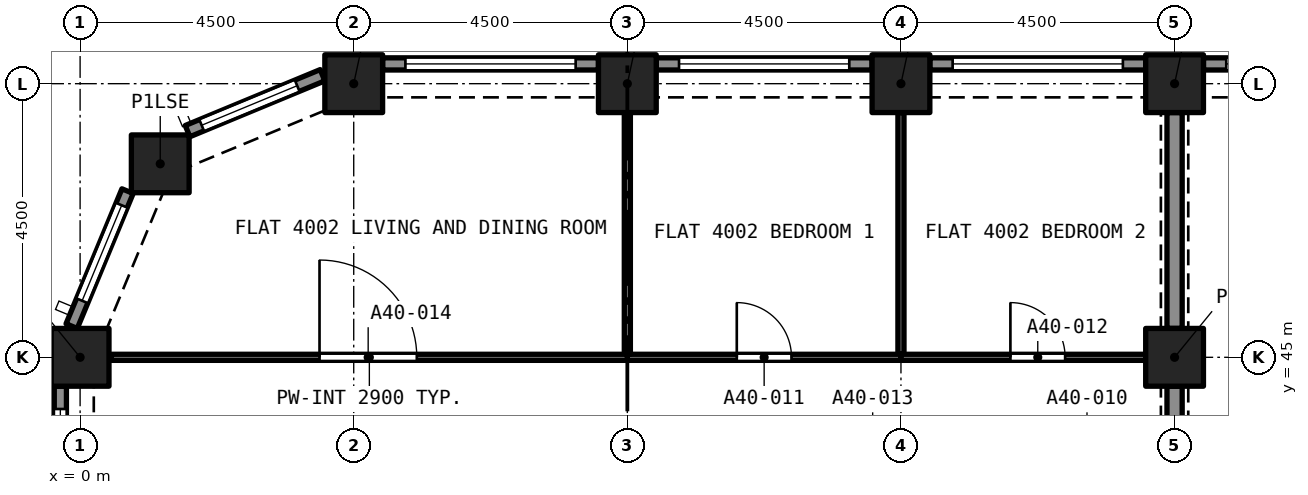
"""IFC4 building model, lengths in metres.
Left out: names, types, materials, properties, quantities, classifications, styles, units other than length and angle.
Written with IfcOpenShell. Run it as: python <this file> out.ifc"""

import sys

from ifc_helpers import new_model, si_unit, direction, frame, frame_2d, origin, origin_2d, place, context, subcontext, project, spatial, rectangle, extrude, element, fill, save


model = new_model("IFC4")
c1 = context("Model", 3, precision=1e-05, world=origin(), true_north=direction((0.0, 1.0)))
c2 = subcontext(c1, "Body", "Model", "MODEL_VIEW")
j1 = project(units=[si_unit("LENGTHUNIT", "METRE"), si_unit("PLANEANGLEUNIT", "RADIAN")], contexts=[c1])
p1 = place(None, origin())
s1 = spatial("IfcSite", under=j1, at=p1, CompositionType="ELEMENT")
p2 = place(p1, origin())
s2 = spatial("IfcBuilding", under=s1, at=p2, CompositionType="ELEMENT")
p3 = place(p2, frame((0.0, 0.0, 143.0)))
s3 = spatial("IfcBuildingStorey", under=s2, at=p3, CompositionType="ELEMENT", Elevation=143.0)
for number, where, z_axis, x_axis in (
    (1, (0.0, 45.0, 0.0), (0.0, 0.0, 1.0), (1.0, 0.0, 0.0)),
    (2, (18.0, 45.0, 0.0), (0.0, 0.0, 1.0), (1.0, 0.0, 0.0)),
    (3, (1.318, 48.182, 0.0), (0.0, 0.0, 1.0), (1.0, 0.0, 0.0)),
    (4, (4.5, 49.5, 0.0), (0.0, 0.0, 1.0), (1.0, 0.0, 0.0)),
    (5, (9.0, 49.5, 0.0), (0.0, 0.0, 1.0), (1.0, 0.0, 0.0)),
    (6, (13.5, 49.5, 0.0), (0.0, 0.0, 1.0), (1.0, 0.0, 0.0)),
    (7, (18.0, 49.5, 0.0), (0.0, 0.0, 1.0), (1.0, 0.0, 0.0)),
):
    element("IfcColumn", number, at=place(p3, frame(where, z_axis=z_axis, x_axis=x_axis)), inside=s3, PredefinedType="COLUMN", context=c2, shape_type="SweptSolid", body=[
        extrude(rectangle(XDim=0.95, YDim=0.95, at=origin_2d()), origin(), (0.0, 0.0, 1.0), 3.2),
    ])
p4 = place(p3, frame((18.475, 49.825, 0.0), z_axis=(0.0, 0.0, 1.0), x_axis=(1.0, 0.0, 0.0)))
e8 = element("IfcWall", 8, at=p4, inside=s3, PredefinedType="SOLIDWALL", context=c2, shape_type="SweptSolid", body=[
    extrude(rectangle(XDim=3.55, YDim=0.2, at=frame_2d((1.775, 0.0))), origin(), (0.0, 0.0, 1.0), 3.2),
])
p5 = place(p4, frame((0.375, 0.0, 0.45)))
e9 = element("IfcOpeningElement", 9, at=p5, cuts=e8, PredefinedType="OPENING", context=c2, shape_type="SweptSolid", body=[
    extrude(rectangle(XDim=2.8, YDim=1.95, at=frame_2d((1.4, 0.975))), frame((0.0, 0.11, 0.0), z_axis=(0.0, -1.0, 0.0), x_axis=(1.0, 0.0, 0.0)), (0.0, 0.0, 1.0), 0.22),
])
p6 = place(p3, frame((13.975, 49.825, 0.0), z_axis=(0.0, 0.0, 1.0), x_axis=(1.0, 0.0, 0.0)))
e10 = element("IfcWall", 10, at=p6, inside=s3, PredefinedType="SOLIDWALL", context=c2, shape_type="SweptSolid", body=[
    extrude(rectangle(XDim=3.55, YDim=0.2, at=frame_2d((1.775, 0.0))), origin(), (0.0, 0.0, 1.0), 3.2),
])
p7 = place(p6, frame((0.375, 0.0, 0.45)))
e11 = element("IfcOpeningElement", 11, at=p7, cuts=e10, PredefinedType="OPENING", context=c2, shape_type="SweptSolid", body=[
    extrude(rectangle(XDim=2.8, YDim=1.95, at=frame_2d((1.4, 0.975))), frame((0.0, 0.11, 0.0), z_axis=(0.0, -1.0, 0.0), x_axis=(1.0, 0.0, 0.0)), (0.0, 0.0, 1.0), 0.22),
])
p8 = place(p3, frame((9.475, 49.825, 0.0), z_axis=(0.0, 0.0, 1.0), x_axis=(1.0, 0.0, 0.0)))
e12 = element("IfcWall", 12, at=p8, inside=s3, PredefinedType="SOLIDWALL", context=c2, shape_type="SweptSolid", body=[
    extrude(rectangle(XDim=3.55, YDim=0.2, at=frame_2d((1.775, 0.0))), origin(), (0.0, 0.0, 1.0), 3.2),
])
p9 = place(p8, frame((0.375, 0.0, 0.45)))
e13 = element("IfcOpeningElement", 13, at=p9, cuts=e12, PredefinedType="OPENING", context=c2, shape_type="SweptSolid", body=[
    extrude(rectangle(XDim=2.8, YDim=1.95, at=frame_2d((1.4, 0.975))), frame((0.0, 0.11, 0.0), z_axis=(0.0, -1.0, 0.0), x_axis=(1.0, 0.0, 0.0)), (0.0, 0.0, 1.0), 0.22),
])
p10 = place(p3, frame((4.975, 49.825, 0.0), z_axis=(0.0, 0.0, 1.0), x_axis=(1.0, 0.0, 0.0)))
e14 = element("IfcWall", 14, at=p10, inside=s3, PredefinedType="SOLIDWALL", context=c2, shape_type="SweptSolid", body=[
    extrude(rectangle(XDim=3.55, YDim=0.2, at=frame_2d((1.775, 0.0))), origin(), (0.0, 0.0, 1.0), 3.2),
])
p11 = place(p10, frame((0.375, 0.0, 0.45)))
e15 = element("IfcOpeningElement", 15, at=p11, cuts=e14, PredefinedType="OPENING", context=c2, shape_type="SweptSolid", body=[
    extrude(rectangle(XDim=2.8, YDim=1.95, at=frame_2d((1.4, 0.975))), frame((0.0, 0.11, 0.0), z_axis=(0.0, -1.0, 0.0), x_axis=(1.0, 0.0, 0.0)), (0.0, 0.0, 1.0), 0.22),
])
p12 = place(p3, frame((1.767, 48.72, 0.0), z_axis=(0.0, 0.0, 1.0), x_axis=(0.923880599843, 0.382680855588, 0.0)))
e16 = element("IfcWall", 16, at=p12, inside=s3, PredefinedType="SOLIDWALL", context=c2, shape_type="SweptSolid", body=[
    extrude(rectangle(XDim=2.403, YDim=0.2, at=frame_2d((1.201, 0.0))), origin(), (0.0, 0.0, 1.0), 3.2),
])
p13 = place(p12, frame((0.251, 0.0, 0.45)))
e17 = element("IfcOpeningElement", 17, at=p13, cuts=e16, PredefinedType="OPENING", context=c2, shape_type="SweptSolid", body=[
    extrude(rectangle(XDim=1.7, YDim=1.95, at=frame_2d((0.85, 0.975))), frame((0.0, 0.11, 0.0), z_axis=(0.0, -1.0, 0.0), x_axis=(1.0, 0.0, 0.0)), (0.0, 0.0, 1.0), 0.22),
])
p14 = place(p3, frame((-0.139, 45.513, 0.0), z_axis=(0.0, 0.0, 1.0), x_axis=(0.382680855588, 0.923880599843, 0.0)))
e18 = element("IfcWall", 18, at=p14, inside=s3, PredefinedType="SOLIDWALL", context=c2, shape_type="SweptSolid", body=[
    extrude(rectangle(XDim=2.403, YDim=0.2, at=frame_2d((1.201, 0.0))), origin(), (0.0, 0.0, 1.0), 3.2),
])
p15 = place(p14, frame((0.451, 0.0, 0.45)))
e19 = element("IfcOpeningElement", 19, at=p15, cuts=e18, PredefinedType="OPENING", context=c2, shape_type="SweptSolid", body=[
    extrude(rectangle(XDim=1.7, YDim=1.95, at=frame_2d((0.85, 0.975))), frame((0.0, 0.11, 0.0), z_axis=(0.0, -1.0, 0.0), x_axis=(1.0, 0.0, 0.0)), (0.0, 0.0, 1.0), 0.22),
])
p16 = place(p3, frame((-0.325, 40.975, 0.0), z_axis=(0.0, 0.0, 1.0), x_axis=(0.0, 1.0, 0.0)))
e20 = element("IfcWall", 20, at=p16, inside=s3, PredefinedType="SOLIDWALL", context=c2, shape_type="SweptSolid", body=[
    extrude(rectangle(XDim=3.55, YDim=0.2, at=frame_2d((1.775, 0.0))), origin(), (0.0, 0.0, 1.0), 3.2),
])
p17 = place(p16, frame((0.375, 0.0, 0.45)))
e21 = element("IfcOpeningElement", 21, at=p17, cuts=e20, PredefinedType="OPENING", context=c2, shape_type="SweptSolid", body=[
    extrude(rectangle(XDim=2.8, YDim=1.95, at=frame_2d((1.4, 0.975))), frame((0.0, 0.11, 0.0), z_axis=(0.0, -1.0, 0.0), x_axis=(1.0, 0.0, 0.0)), (0.0, 0.0, 1.0), 0.22),
])
p18 = place(p3, frame((18.0, 40.975, 0.0), z_axis=(0.0, 0.0, 1.0), x_axis=(0.0, 1.0, 0.0)))
e22 = element("IfcWall", 22, at=p18, inside=s3, PredefinedType="PARTITIONING", context=c2, shape_type="SweptSolid", body=[
    extrude(rectangle(XDim=3.55, YDim=0.25, at=frame_2d((1.775, 0.0))), origin(), (0.0, 0.0, 1.0), 2.38),
])
p19 = place(p3, frame((13.5, 45.05, 0.0), z_axis=(0.0, 0.0, 1.0), x_axis=(0.0, 1.0, 0.0)))
e23 = element("IfcWall", 23, at=p19, inside=s3, PredefinedType="PARTITIONING", context=c2, shape_type="SweptSolid", body=[
    extrude(rectangle(XDim=3.975, YDim=0.1, at=frame_2d((1.987, 0.0))), origin(), (0.0, 0.0, 1.0), 2.9),
])
p20 = place(p3, frame((9.0, 45.0, 0.0), z_axis=(0.0, 0.0, 1.0), x_axis=(1.0, 0.0, 0.0)))
e24 = element("IfcWall", 24, at=p20, inside=s3, PredefinedType="PARTITIONING", context=c2, shape_type="SweptSolid", body=[
    extrude(rectangle(XDim=4.5, YDim=0.1, at=frame_2d((2.25, 0.0))), origin(), (0.0, 0.0, 1.0), 2.9),
])
p21 = place(p20, frame((1.8, 0.0, 0.0)))
e25 = element("IfcOpeningElement", 25, at=p21, cuts=e24, PredefinedType="OPENING", context=c2, shape_type="SweptSolid", body=[
    extrude(rectangle(XDim=0.9, YDim=2.1, at=frame_2d((0.45, 1.05))), frame((0.0, 0.06, 0.0), z_axis=(0.0, -1.0, 0.0), x_axis=(1.0, 0.0, 0.0)), (0.0, 0.0, 1.0), 0.12),
])
p22 = place(p3, frame((9.0, 45.05, 0.0), z_axis=(0.0, 0.0, 1.0), x_axis=(0.0, 1.0, 0.0)))
e26 = element("IfcWall", 26, at=p22, inside=s3, PredefinedType="PARTITIONING", context=c2, shape_type="SweptSolid", body=[
    extrude(rectangle(XDim=3.975, YDim=0.1, at=frame_2d((1.987, 0.0))), origin(), (0.0, 0.0, 1.0), 2.9),
])
p23 = place(p3, frame((13.5, 45.0, 0.0), z_axis=(0.0, 0.0, 1.0), x_axis=(1.0, 0.0, 0.0)))
e27 = element("IfcWall", 27, at=p23, inside=s3, PredefinedType="PARTITIONING", context=c2, shape_type="SweptSolid", body=[
    extrude(rectangle(XDim=4.025, YDim=0.1, at=frame_2d((2.012, 0.0))), origin(), (0.0, 0.0, 1.0), 2.9),
])
p24 = place(p23, frame((1.8, 0.0, 0.0)))
e28 = element("IfcOpeningElement", 28, at=p24, cuts=e27, PredefinedType="OPENING", context=c2, shape_type="SweptSolid", body=[
    extrude(rectangle(XDim=0.9, YDim=2.1, at=frame_2d((0.45, 1.05))), frame((0.0, 0.06, 0.0), z_axis=(0.0, -1.0, 0.0), x_axis=(1.0, 0.0, 0.0)), (0.0, 0.0, 1.0), 0.12),
])
p25 = place(p3, frame((18.0, 45.475, 0.0), z_axis=(0.0, 0.0, 1.0), x_axis=(0.0, 1.0, 0.0)))
e29 = element("IfcWall", 29, at=p25, inside=s3, PredefinedType="PARTITIONING", context=c2, shape_type="SweptSolid", body=[
    extrude(rectangle(XDim=3.55, YDim=0.25, at=frame_2d((1.775, 0.0))), origin(), (0.0, 0.0, 1.0), 2.38),
])
p26 = place(p3, frame((0.514, 45.0, 0.0), z_axis=(0.0, 0.0, 1.0), x_axis=(1.0, 0.0, 0.0)))
e30 = element("IfcWall", 30, at=p26, inside=s3, PredefinedType="PARTITIONING", context=c2, shape_type="SweptSolid", body=[
    extrude(rectangle(XDim=8.486, YDim=0.1, at=frame_2d((4.243, 0.0))), origin(), (0.0, 0.0, 1.0), 2.9),
])
p27 = place(p26, frame((3.423, 0.0, 0.0)))
e31 = element("IfcOpeningElement", 31, at=p27, cuts=e30, PredefinedType="OPENING", context=c2, shape_type="SweptSolid", body=[
    extrude(rectangle(XDim=1.6, YDim=2.1, at=frame_2d((0.8, 1.05))), frame((0.0, 0.06, 0.0), z_axis=(0.0, -1.0, 0.0), x_axis=(1.0, 0.0, 0.0)), (0.0, 0.0, 1.0), 0.12),
])
p28 = place(p5, origin())
e32 = element("IfcWindow", 32, at=p28, inside=s3, PartitioningType="SINGLE_PANEL", PredefinedType="WINDOW", context=c2, shape_type="SweptSolid", body=[
    extrude(rectangle(XDim=2.8, YDim=1.95, at=frame_2d((1.4, 0.975))), frame((0.0, 0.03, 0.0), z_axis=(0.0, -1.0, 0.0), x_axis=(1.0, 0.0, 0.0)), (0.0, 0.0, 1.0), 0.06),
])
fill(e9, e32)
p29 = place(p7, origin())
e33 = element("IfcWindow", 33, at=p29, inside=s3, PartitioningType="SINGLE_PANEL", PredefinedType="WINDOW", context=c2, shape_type="SweptSolid", body=[
    extrude(rectangle(XDim=2.8, YDim=1.95, at=frame_2d((1.4, 0.975))), frame((0.0, 0.03, 0.0), z_axis=(0.0, -1.0, 0.0), x_axis=(1.0, 0.0, 0.0)), (0.0, 0.0, 1.0), 0.06),
])
fill(e11, e33)
p30 = place(p9, origin())
e34 = element("IfcWindow", 34, at=p30, inside=s3, PartitioningType="SINGLE_PANEL", PredefinedType="WINDOW", context=c2, shape_type="SweptSolid", body=[
    extrude(rectangle(XDim=2.8, YDim=1.95, at=frame_2d((1.4, 0.975))), frame((0.0, 0.03, 0.0), z_axis=(0.0, -1.0, 0.0), x_axis=(1.0, 0.0, 0.0)), (0.0, 0.0, 1.0), 0.06),
])
fill(e13, e34)
p31 = place(p11, origin())
e35 = element("IfcWindow", 35, at=p31, inside=s3, PartitioningType="SINGLE_PANEL", PredefinedType="WINDOW", context=c2, shape_type="SweptSolid", body=[
    extrude(rectangle(XDim=2.8, YDim=1.95, at=frame_2d((1.4, 0.975))), frame((0.0, 0.03, 0.0), z_axis=(0.0, -1.0, 0.0), x_axis=(1.0, 0.0, 0.0)), (0.0, 0.0, 1.0), 0.06),
])
fill(e15, e35)
p32 = place(p13, origin())
e36 = element("IfcWindow", 36, at=p32, inside=s3, PartitioningType="SINGLE_PANEL", PredefinedType="WINDOW", context=c2, shape_type="SweptSolid", body=[
    extrude(rectangle(XDim=1.7, YDim=1.95, at=frame_2d((0.85, 0.975))), frame((0.0, 0.03, 0.0), z_axis=(0.0, -1.0, 0.0), x_axis=(1.0, 0.0, 0.0)), (0.0, 0.0, 1.0), 0.06),
])
fill(e17, e36)
p33 = place(p15, origin())
e37 = element("IfcWindow", 37, at=p33, inside=s3, PartitioningType="SINGLE_PANEL", PredefinedType="WINDOW", context=c2, shape_type="SweptSolid", body=[
    extrude(rectangle(XDim=1.7, YDim=1.95, at=frame_2d((0.85, 0.975))), frame((0.0, 0.03, 0.0), z_axis=(0.0, -1.0, 0.0), x_axis=(1.0, 0.0, 0.0)), (0.0, 0.0, 1.0), 0.06),
])
fill(e19, e37)
p34 = place(p17, origin())
e38 = element("IfcWindow", 38, at=p34, inside=s3, PartitioningType="SINGLE_PANEL", PredefinedType="WINDOW", context=c2, shape_type="SweptSolid", body=[
    extrude(rectangle(XDim=2.8, YDim=1.95, at=frame_2d((1.4, 0.975))), frame((0.0, 0.03, 0.0), z_axis=(0.0, -1.0, 0.0), x_axis=(1.0, 0.0, 0.0)), (0.0, 0.0, 1.0), 0.06),
])
fill(e21, e38)
p35 = place(p21, origin())
e39 = element("IfcDoor", 39, at=p35, inside=s3, OperationType="SINGLE_SWING_LEFT", PredefinedType="DOOR", context=c2, shape_type="SweptSolid", body=[
    extrude(rectangle(XDim=0.9, YDim=2.1, at=frame_2d((0.45, 1.05))), frame((0.0, 0.025, 0.0), z_axis=(0.0, -1.0, 0.0), x_axis=(1.0, 0.0, 0.0)), (0.0, 0.0, 1.0), 0.05),
])
fill(e25, e39)
p36 = place(p24, origin())
e40 = element("IfcDoor", 40, at=p36, inside=s3, OperationType="SINGLE_SWING_RIGHT", PredefinedType="DOOR", context=c2, shape_type="SweptSolid", body=[
    extrude(rectangle(XDim=0.9, YDim=2.1, at=frame_2d((0.45, 1.05))), frame((0.0, 0.025, 0.0), z_axis=(0.0, -1.0, 0.0), x_axis=(1.0, 0.0, 0.0)), (0.0, 0.0, 1.0), 0.05),
])
fill(e28, e40)
p37 = place(p27, origin())
e41 = element("IfcDoor", 41, at=p37, inside=s3, OperationType="SINGLE_SWING_LEFT", PredefinedType="DOOR", context=c2, shape_type="SweptSolid", body=[
    extrude(rectangle(XDim=1.6, YDim=2.1, at=frame_2d((0.8, 1.05))), frame((0.0, 0.025, 0.0), z_axis=(0.0, -1.0, 0.0), x_axis=(1.0, 0.0, 0.0)), (0.0, 0.0, 1.0), 0.05),
])
fill(e31, e41)
save(model, sys.argv[1])
